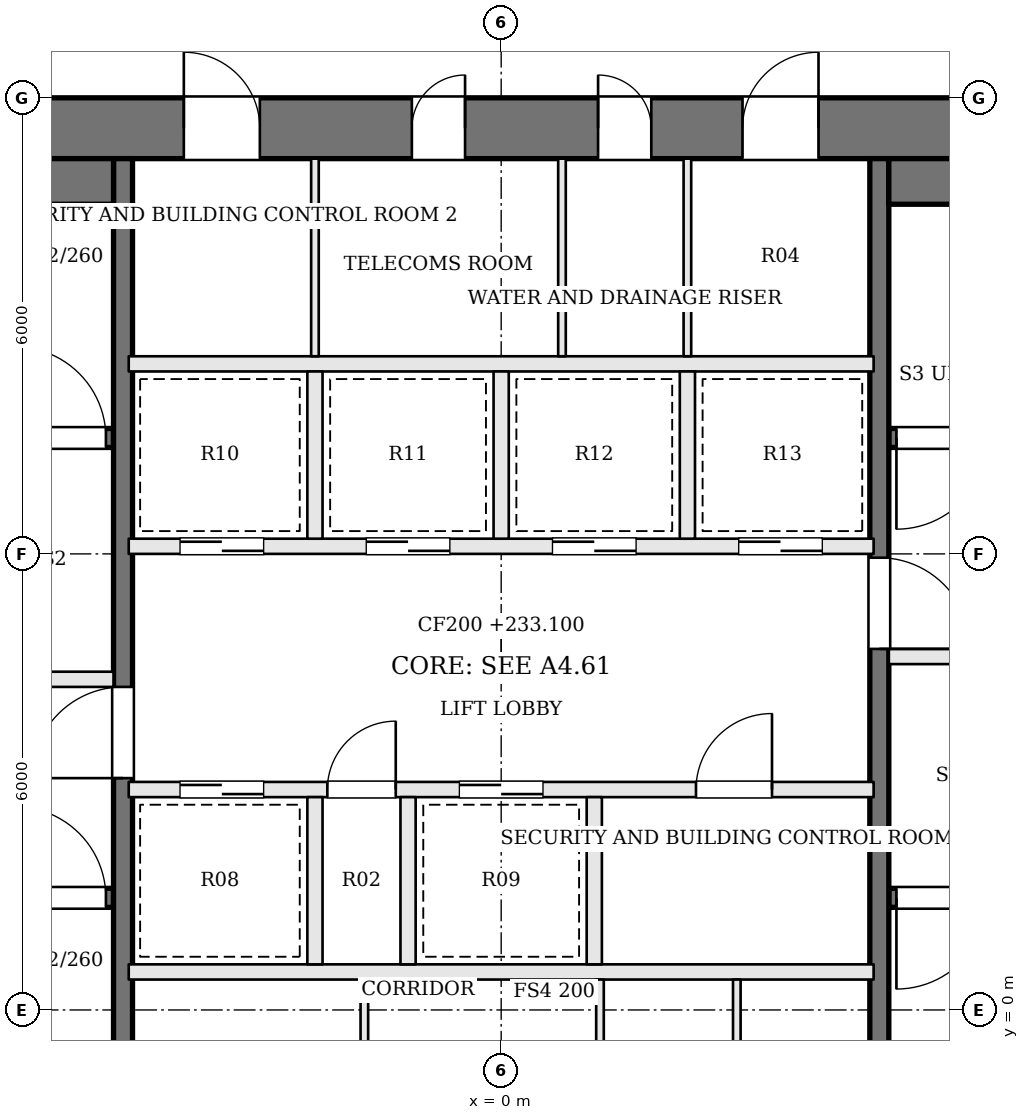
"""IFC4 building model, lengths in metres.
Left out: names, types, materials, properties, quantities, classifications, styles, units other than length and angle.
Written with IfcOpenShell. Run it as: python <this file> out.ifc"""

import sys

from ifc_helpers import new_model, si_unit, direction, frame, frame_2d, origin, place, context, subcontext, project, spatial, rectangle, extrude, element, fill, save


model = new_model("IFC4")
c1 = context("Model", 3, precision=1e-05, world=origin(), true_north=direction((0.0, 1.0)))
c2 = subcontext(c1, "Body", "Model", "MODEL_VIEW")
j1 = project(units=[si_unit("LENGTHUNIT", "METRE"), si_unit("PLANEANGLEUNIT", "RADIAN")], contexts=[c1])
p1 = place(None, origin())
s1 = spatial("IfcSite", under=j1, at=p1, CompositionType="ELEMENT")
p2 = place(p1, origin())
s2 = spatial("IfcBuilding", under=s1, at=p2, CompositionType="ELEMENT")
p3 = place(p2, frame((0.0, 0.0, 233.1)))
s3 = spatial("IfcBuildingStorey", under=s2, at=p3, CompositionType="ELEMENT", Elevation=233.1)
p4 = place(p3, frame((-13.0, 11.6, 0.0), z_axis=(0.0, 0.0, 1.0), x_axis=(1.0, 0.0, 0.0)))
e1 = element("IfcWall", 1, at=p4, inside=s3, PredefinedType="SHEAR", context=c2, shape_type="SweptSolid", body=[
    extrude(rectangle(XDim=26.0, YDim=0.8, at=frame_2d((13.0, 0.0))), origin(), (0.0, 0.0, 1.0), 3.9),
])
p5 = place(p4, frame((8.825, 0.0, 0.0)))
e2 = element("IfcOpeningElement", 2, at=p5, cuts=e1, PredefinedType="OPENING", context=c2, shape_type="SweptSolid", body=[
    extrude(rectangle(XDim=1.0, YDim=2.1, at=frame_2d((0.5, 1.05))), frame((0.0, 0.41, 0.0), z_axis=(0.0, -1.0, 0.0), x_axis=(1.0, 0.0, 0.0)), (0.0, 0.0, 1.0), 0.82),
])
p6 = place(p4, frame((11.825, 0.0, 0.0)))
e3 = element("IfcOpeningElement", 3, at=p6, cuts=e1, PredefinedType="OPENING", context=c2, shape_type="SweptSolid", body=[
    extrude(rectangle(XDim=0.7, YDim=2.1, at=frame_2d((0.35, 1.05))), frame((0.0, 0.41, 0.0), z_axis=(0.0, -1.0, 0.0), x_axis=(1.0, 0.0, 0.0)), (0.0, 0.0, 1.0), 0.82),
])
p7 = place(p4, frame((14.275, 0.0, 0.0)))
e4 = element("IfcOpeningElement", 4, at=p7, cuts=e1, PredefinedType="OPENING", context=c2, shape_type="SweptSolid", body=[
    extrude(rectangle(XDim=0.7, YDim=2.1, at=frame_2d((0.35, 1.05))), frame((0.0, 0.41, 0.0), z_axis=(0.0, -1.0, 0.0), x_axis=(1.0, 0.0, 0.0)), (0.0, 0.0, 1.0), 0.82),
])
p8 = place(p4, frame((16.175, 0.0, 0.0)))
e5 = element("IfcOpeningElement", 5, at=p8, cuts=e1, PredefinedType="OPENING", context=c2, shape_type="SweptSolid", body=[
    extrude(rectangle(XDim=1.0, YDim=2.1, at=frame_2d((0.5, 1.05))), frame((0.0, 0.41, 0.0), z_axis=(0.0, -1.0, 0.0), x_axis=(1.0, 0.0, 0.0)), (0.0, 0.0, 1.0), 0.82),
])
p9 = place(p3, frame((-12.2, 1.475, 0.0), z_axis=(0.0, 0.0, 1.0), x_axis=(1.0, 0.0, 0.0)))
e6 = element("IfcWall", 6, at=p9, inside=s3, PredefinedType="SOLIDWALL", context=c2, shape_type="SweptSolid", body=[
    extrude(rectangle(XDim=7.1, YDim=0.25, at=frame_2d((3.55, 0.0))), origin(), (0.0, 0.0, 1.0), 3.7),
])
p10 = place(p9, frame((5.8, 0.0, 0.0)))
e7 = element("IfcOpeningElement", 7, at=p10, cuts=e6, PredefinedType="OPENING", context=c2, shape_type="SweptSolid", body=[
    extrude(rectangle(XDim=1.2, YDim=2.1, at=frame_2d((0.6, 1.05))), frame((0.0, 0.135, 0.0), z_axis=(0.0, -1.0, 0.0), x_axis=(1.0, 0.0, 0.0)), (0.0, 0.0, 1.0), 0.27),
])
p11 = place(p3, frame((12.2, 7.525, 0.0), z_axis=(0.0, 0.0, 1.0), x_axis=(-1.0, 0.0, 0.0)))
e8 = element("IfcWall", 8, at=p11, inside=s3, PredefinedType="SOLIDWALL", context=c2, shape_type="SweptSolid", body=[
    extrude(rectangle(XDim=7.1, YDim=0.25, at=frame_2d((3.55, 0.0))), origin(), (0.0, 0.0, 1.0), 3.7),
])
p12 = place(p11, frame((5.8, 0.0, 0.0)))
e9 = element("IfcOpeningElement", 9, at=p12, cuts=e8, PredefinedType="OPENING", context=c2, shape_type="SweptSolid", body=[
    extrude(rectangle(XDim=1.2, YDim=2.1, at=frame_2d((0.6, 1.05))), frame((0.0, 0.135, 0.0), z_axis=(0.0, -1.0, 0.0), x_axis=(1.0, 0.0, 0.0)), (0.0, 0.0, 1.0), 0.27),
])
p13 = place(p3, frame((-12.2, 4.35, 0.0), z_axis=(0.0, 0.0, 1.0), x_axis=(1.0, 0.0, 0.0)))
e10 = element("IfcWall", 10, at=p13, inside=s3, PredefinedType="SOLIDWALL", context=c2, shape_type="SweptSolid", body=[
    extrude(rectangle(XDim=7.1, YDim=0.2, at=frame_2d((3.55, 0.0))), origin(), (0.0, 0.0, 1.0), 3.7),
])
p14 = place(p13, frame((4.4, 0.0, 0.0)))
e11 = element("IfcOpeningElement", 11, at=p14, cuts=e10, PredefinedType="OPENING", context=c2, shape_type="SweptSolid", body=[
    extrude(rectangle(XDim=1.2, YDim=2.1, at=frame_2d((0.6, 1.05))), frame((0.0, 0.11, 0.0), z_axis=(0.0, -1.0, 0.0), x_axis=(1.0, 0.0, 0.0)), (0.0, 0.0, 1.0), 0.22),
])
p15 = place(p13, frame((1.1, 0.0, 0.0)))
e12 = element("IfcOpeningElement", 12, at=p15, cuts=e10, PredefinedType="OPENING", context=c2, shape_type="SweptSolid", body=[
    extrude(rectangle(XDim=1.2, YDim=2.1, at=frame_2d((0.6, 1.05))), frame((0.0, 0.11, 0.0), z_axis=(0.0, -1.0, 0.0), x_axis=(1.0, 0.0, 0.0)), (0.0, 0.0, 1.0), 0.22),
])
p16 = place(p3, frame((12.2, 4.65, 0.0), z_axis=(0.0, 0.0, 1.0), x_axis=(-1.0, 0.0, 0.0)))
e13 = element("IfcWall", 13, at=p16, inside=s3, PredefinedType="SOLIDWALL", context=c2, shape_type="SweptSolid", body=[
    extrude(rectangle(XDim=7.1, YDim=0.2, at=frame_2d((3.55, 0.0))), origin(), (0.0, 0.0, 1.0), 3.7),
])
p17 = place(p16, frame((4.4, 0.0, 0.0)))
e14 = element("IfcOpeningElement", 14, at=p17, cuts=e13, PredefinedType="OPENING", context=c2, shape_type="SweptSolid", body=[
    extrude(rectangle(XDim=1.2, YDim=2.1, at=frame_2d((0.6, 1.05))), frame((0.0, 0.11, 0.0), z_axis=(0.0, -1.0, 0.0), x_axis=(1.0, 0.0, 0.0)), (0.0, 0.0, 1.0), 0.22),
])
p18 = place(p16, frame((1.1, 0.0, 0.0)))
e15 = element("IfcOpeningElement", 15, at=p18, cuts=e13, PredefinedType="OPENING", context=c2, shape_type="SweptSolid", body=[
    extrude(rectangle(XDim=1.2, YDim=2.1, at=frame_2d((0.6, 1.05))), frame((0.0, 0.11, 0.0), z_axis=(0.0, -1.0, 0.0), x_axis=(1.0, 0.0, 0.0)), (0.0, 0.0, 1.0), 0.22),
])
p19 = place(p3, frame((-12.2, 7.525, 0.0), z_axis=(0.0, 0.0, 1.0), x_axis=(1.0, 0.0, 0.0)))
e16 = element("IfcWall", 16, at=p19, inside=s3, PredefinedType="SOLIDWALL", context=c2, shape_type="SweptSolid", body=[
    extrude(rectangle(XDim=7.1, YDim=0.25, at=frame_2d((3.55, 0.0))), origin(), (0.0, 0.0, 1.0), 3.7),
])
p20 = place(p19, frame((5.8, 0.0, 0.0)))
e17 = element("IfcOpeningElement", 17, at=p20, cuts=e16, PredefinedType="OPENING", context=c2, shape_type="SweptSolid", body=[
    extrude(rectangle(XDim=1.2, YDim=2.1, at=frame_2d((0.6, 1.05))), frame((0.0, 0.135, 0.0), z_axis=(0.0, -1.0, 0.0), x_axis=(1.0, 0.0, 0.0)), (0.0, 0.0, 1.0), 0.27),
])
p21 = place(p3, frame((12.2, 1.475, 0.0), z_axis=(0.0, 0.0, 1.0), x_axis=(-1.0, 0.0, 0.0)))
e18 = element("IfcWall", 18, at=p21, inside=s3, PredefinedType="SOLIDWALL", context=c2, shape_type="SweptSolid", body=[
    extrude(rectangle(XDim=7.1, YDim=0.25, at=frame_2d((3.55, 0.0))), origin(), (0.0, 0.0, 1.0), 3.7),
])
p22 = place(p21, frame((5.8, 0.0, 0.0)))
e19 = element("IfcOpeningElement", 19, at=p22, cuts=e18, PredefinedType="OPENING", context=c2, shape_type="SweptSolid", body=[
    extrude(rectangle(XDim=1.2, YDim=2.1, at=frame_2d((0.6, 1.05))), frame((0.0, 0.135, 0.0), z_axis=(0.0, -1.0, 0.0), x_axis=(1.0, 0.0, 0.0)), (0.0, 0.0, 1.0), 0.27),
])
p23 = place(p3, frame((-4.975, -2.2, 0.0), z_axis=(0.0, 0.0, 1.0), x_axis=(0.0, 1.0, 0.0)))
e20 = element("IfcWall", 20, at=p23, inside=s3, PredefinedType="SOLIDWALL", context=c2, shape_type="SweptSolid", body=[
    extrude(rectangle(XDim=13.4, YDim=0.25, at=frame_2d((6.7, 0.0))), origin(), (0.0, 0.0, 1.0), 3.7),
])
p24 = place(p23, frame((5.25, 0.0, 0.0)))
e21 = element("IfcOpeningElement", 21, at=p24, cuts=e20, PredefinedType="OPENING", context=c2, shape_type="SweptSolid", body=[
    extrude(rectangle(XDim=1.2, YDim=2.1, at=frame_2d((0.6, 1.05))), frame((0.0, 0.135, 0.0), z_axis=(0.0, -1.0, 0.0), x_axis=(1.0, 0.0, 0.0)), (0.0, 0.0, 1.0), 0.27),
])
p25 = place(p3, frame((4.975, 11.2, 0.0), z_axis=(0.0, 0.0, 1.0), x_axis=(0.0, -1.0, 0.0)))
e22 = element("IfcWall", 22, at=p25, inside=s3, PredefinedType="SOLIDWALL", context=c2, shape_type="SweptSolid", body=[
    extrude(rectangle(XDim=13.4, YDim=0.25, at=frame_2d((6.7, 0.0))), origin(), (0.0, 0.0, 1.0), 3.7),
])
p26 = place(p25, frame((5.25, 0.0, 0.0)))
e23 = element("IfcOpeningElement", 23, at=p26, cuts=e22, PredefinedType="OPENING", context=c2, shape_type="SweptSolid", body=[
    extrude(rectangle(XDim=1.2, YDim=2.1, at=frame_2d((0.6, 1.05))), frame((0.0, 0.135, 0.0), z_axis=(0.0, -1.0, 0.0), x_axis=(1.0, 0.0, 0.0)), (0.0, 0.0, 1.0), 0.27),
])
for number, where, z_axis, x_axis in (
    (24, (-12.2, 10.9, 0.0), (0.0, 0.0, 1.0), (1.0, 0.0, 0.0)),
    (25, (12.2, 10.9, 0.0), (0.0, 0.0, 1.0), (-1.0, 0.0, 0.0)),
):
    element("IfcWall", number, at=place(p3, frame(where, z_axis=z_axis, x_axis=x_axis)), inside=s3, PredefinedType="SOLIDWALL", context=c2, shape_type="SweptSolid", body=[
        extrude(rectangle(XDim=7.1, YDim=0.6, at=frame_2d((3.55, 0.0))), origin(), (0.0, 0.0, 1.0), 3.7),
    ])
p27 = place(p3, frame((-4.9, 0.5, 0.0), z_axis=(0.0, 0.0, 1.0), x_axis=(1.0, 0.0, 0.0)))
e26 = element("IfcWall", 26, at=p27, inside=s3, PredefinedType="SOLIDWALL", context=c2, shape_type="SweptSolid", body=[
    extrude(rectangle(XDim=9.8, YDim=0.2, at=frame_2d((4.9, 0.0))), origin(), (0.0, 0.0, 1.0), 3.7),
])
p28 = place(p3, frame((-4.9, 2.9, 0.0), z_axis=(0.0, 0.0, 1.0), x_axis=(1.0, 0.0, 0.0)))
e27 = element("IfcWall", 27, at=p28, inside=s3, PredefinedType="SOLIDWALL", context=c2, shape_type="SweptSolid", body=[
    extrude(rectangle(XDim=9.8, YDim=0.2, at=frame_2d((4.9, 0.0))), origin(), (0.0, 0.0, 1.0), 3.7),
])
p29 = place(p28, frame((0.675, 0.0, 0.0)))
e28 = element("IfcOpeningElement", 28, at=p29, cuts=e27, PredefinedType="OPENING", context=c2, shape_type="SweptSolid", body=[
    extrude(rectangle(XDim=1.1, YDim=2.1, at=frame_2d((0.55, 1.05))), frame((0.0, 0.11, 0.0), z_axis=(0.0, -1.0, 0.0), x_axis=(1.0, 0.0, 0.0)), (0.0, 0.0, 1.0), 0.22),
])
p30 = place(p28, frame((2.613, 0.0, 0.0)))
e29 = element("IfcOpeningElement", 29, at=p30, cuts=e27, PredefinedType="OPENING", context=c2, shape_type="SweptSolid", body=[
    extrude(rectangle(XDim=0.9, YDim=2.1, at=frame_2d((0.45, 1.05))), frame((0.0, 0.11, 0.0), z_axis=(0.0, -1.0, 0.0), x_axis=(1.0, 0.0, 0.0)), (0.0, 0.0, 1.0), 0.22),
])
p31 = place(p28, frame((4.35, 0.0, 0.0)))
e30 = element("IfcOpeningElement", 30, at=p31, cuts=e27, PredefinedType="OPENING", context=c2, shape_type="SweptSolid", body=[
    extrude(rectangle(XDim=1.1, YDim=2.1, at=frame_2d((0.55, 1.05))), frame((0.0, 0.11, 0.0), z_axis=(0.0, -1.0, 0.0), x_axis=(1.0, 0.0, 0.0)), (0.0, 0.0, 1.0), 0.22),
])
p32 = place(p28, frame((7.463, 0.0, 0.0)))
e31 = element("IfcOpeningElement", 31, at=p32, cuts=e27, PredefinedType="OPENING", context=c2, shape_type="SweptSolid", body=[
    extrude(rectangle(XDim=1.0, YDim=2.1, at=frame_2d((0.5, 1.05))), frame((0.0, 0.11, 0.0), z_axis=(0.0, -1.0, 0.0), x_axis=(1.0, 0.0, 0.0)), (0.0, 0.0, 1.0), 0.22),
])
p33 = place(p3, frame((-4.9, 6.1, 0.0), z_axis=(0.0, 0.0, 1.0), x_axis=(1.0, 0.0, 0.0)))
e32 = element("IfcWall", 32, at=p33, inside=s3, PredefinedType="SOLIDWALL", context=c2, shape_type="SweptSolid", body=[
    extrude(rectangle(XDim=9.8, YDim=0.2, at=frame_2d((4.9, 0.0))), origin(), (0.0, 0.0, 1.0), 3.7),
])
p34 = place(p33, frame((0.675, 0.0, 0.0)))
e33 = element("IfcOpeningElement", 33, at=p34, cuts=e32, PredefinedType="OPENING", context=c2, shape_type="SweptSolid", body=[
    extrude(rectangle(XDim=1.1, YDim=2.1, at=frame_2d((0.55, 1.05))), frame((0.0, 0.11, 0.0), z_axis=(0.0, -1.0, 0.0), x_axis=(1.0, 0.0, 0.0)), (0.0, 0.0, 1.0), 0.22),
])
p35 = place(p33, frame((3.125, 0.0, 0.0)))
e34 = element("IfcOpeningElement", 34, at=p35, cuts=e32, PredefinedType="OPENING", context=c2, shape_type="SweptSolid", body=[
    extrude(rectangle(XDim=1.1, YDim=2.1, at=frame_2d((0.55, 1.05))), frame((0.0, 0.11, 0.0), z_axis=(0.0, -1.0, 0.0), x_axis=(1.0, 0.0, 0.0)), (0.0, 0.0, 1.0), 0.22),
])
p36 = place(p33, frame((5.575, 0.0, 0.0)))
e35 = element("IfcOpeningElement", 35, at=p36, cuts=e32, PredefinedType="OPENING", context=c2, shape_type="SweptSolid", body=[
    extrude(rectangle(XDim=1.1, YDim=2.1, at=frame_2d((0.55, 1.05))), frame((0.0, 0.11, 0.0), z_axis=(0.0, -1.0, 0.0), x_axis=(1.0, 0.0, 0.0)), (0.0, 0.0, 1.0), 0.22),
])
p37 = place(p33, frame((8.025, 0.0, 0.0)))
e36 = element("IfcOpeningElement", 36, at=p37, cuts=e32, PredefinedType="OPENING", context=c2, shape_type="SweptSolid", body=[
    extrude(rectangle(XDim=1.1, YDim=2.1, at=frame_2d((0.55, 1.05))), frame((0.0, 0.11, 0.0), z_axis=(0.0, -1.0, 0.0), x_axis=(1.0, 0.0, 0.0)), (0.0, 0.0, 1.0), 0.22),
])
p38 = place(p3, frame((-4.9, 8.5, 0.0), z_axis=(0.0, 0.0, 1.0), x_axis=(1.0, 0.0, 0.0)))
e37 = element("IfcWall", 37, at=p38, inside=s3, PredefinedType="SOLIDWALL", context=c2, shape_type="SweptSolid", body=[
    extrude(rectangle(XDim=9.8, YDim=0.2, at=frame_2d((4.9, 0.0))), origin(), (0.0, 0.0, 1.0), 3.7),
])
for number, where, z_axis, x_axis in (
    (38, (-2.45, 0.6, 0.0), (0.0, 0.0, 1.0), (0.0, 1.0, 0.0)),
    (39, (-1.225, 0.6, 0.0), (0.0, 0.0, 1.0), (0.0, 1.0, 0.0)),
    (40, (1.225, 0.6, 0.0), (0.0, 0.0, 1.0), (0.0, 1.0, 0.0)),
    (41, (-2.45, 6.2, 0.0), (0.0, 0.0, 1.0), (0.0, 1.0, 0.0)),
    (42, (0.0, 6.2, 0.0), (0.0, 0.0, 1.0), (0.0, 1.0, 0.0)),
    (43, (2.45, 6.2, 0.0), (0.0, 0.0, 1.0), (0.0, 1.0, 0.0)),
):
    element("IfcWall", number, at=place(p3, frame(where, z_axis=z_axis, x_axis=x_axis)), inside=s3, PredefinedType="SOLIDWALL", context=c2, shape_type="SweptSolid", body=[
        extrude(rectangle(XDim=2.2, YDim=0.2, at=frame_2d((1.1, 0.0))), origin(), (0.0, 0.0, 1.0), 3.7),
    ])
for number, where, z_axis, x_axis in (
    (44, (-1.8, -2.2, 0.0), (0.0, 0.0, 1.0), (0.0, 1.0, 0.0)),
    (45, (1.3, -2.2, 0.0), (0.0, 0.0, 1.0), (0.0, 1.0, 0.0)),
    (46, (3.1, -2.2, 0.0), (0.0, 0.0, 1.0), (0.0, 1.0, 0.0)),
    (47, (-2.45, 8.6, 0.0), (0.0, 0.0, 1.0), (0.0, 1.0, 0.0)),
    (48, (0.8, 8.6, 0.0), (0.0, 0.0, 1.0), (0.0, 1.0, 0.0)),
    (49, (2.45, 8.6, 0.0), (0.0, 0.0, 1.0), (0.0, 1.0, 0.0)),
):
    element("IfcWall", number, at=place(p3, frame(where, z_axis=z_axis, x_axis=x_axis)), inside=s3, PredefinedType="PARTITIONING", context=c2, shape_type="SweptSolid", body=[
        extrude(rectangle(XDim=2.6, YDim=0.1, at=frame_2d((1.3, 0.0))), origin(), (0.0, 0.0, 1.0), 3.7),
    ])
p39 = place(p24, origin())
e50 = element("IfcDoor", 50, at=p39, inside=s3, OperationType="SINGLE_SWING_LEFT", PredefinedType="DOOR", context=c2, shape_type="SweptSolid", body=[
    extrude(rectangle(XDim=1.2, YDim=2.1, at=frame_2d((0.6, 1.05))), frame((0.0, 0.025, 0.0), z_axis=(0.0, -1.0, 0.0), x_axis=(1.0, 0.0, 0.0)), (0.0, 0.0, 1.0), 0.05),
])
fill(e21, e50)
p40 = place(p26, origin())
e51 = element("IfcDoor", 51, at=p40, inside=s3, OperationType="SINGLE_SWING_RIGHT", PredefinedType="DOOR", context=c2, shape_type="SweptSolid", body=[
    extrude(rectangle(XDim=1.2, YDim=2.1, at=frame_2d((0.6, 1.05))), frame((0.0, 0.025, 0.0), z_axis=(0.0, -1.0, 0.0), x_axis=(1.0, 0.0, 0.0)), (0.0, 0.0, 1.0), 0.05),
])
fill(e23, e51)
p41 = place(p10, origin())
e52 = element("IfcDoor", 52, at=p41, inside=s3, OperationType="SINGLE_SWING_LEFT", PredefinedType="DOOR", context=c2, shape_type="SweptSolid", body=[
    extrude(rectangle(XDim=1.2, YDim=2.1, at=frame_2d((0.6, 1.05))), frame((0.0, 0.025, 0.0), z_axis=(0.0, -1.0, 0.0), x_axis=(1.0, 0.0, 0.0)), (0.0, 0.0, 1.0), 0.05),
])
fill(e7, e52)
p42 = place(p12, origin())
e53 = element("IfcDoor", 53, at=p42, inside=s3, OperationType="SINGLE_SWING_RIGHT", PredefinedType="DOOR", context=c2, shape_type="SweptSolid", body=[
    extrude(rectangle(XDim=1.2, YDim=2.1, at=frame_2d((0.6, 1.05))), frame((0.0, 0.025, 0.0), z_axis=(0.0, -1.0, 0.0), x_axis=(1.0, 0.0, 0.0)), (0.0, 0.0, 1.0), 0.05),
])
fill(e9, e53)
p43 = place(p20, origin())
e54 = element("IfcDoor", 54, at=p43, inside=s3, OperationType="SINGLE_SWING_LEFT", PredefinedType="DOOR", context=c2, shape_type="SweptSolid", body=[
    extrude(rectangle(XDim=1.2, YDim=2.1, at=frame_2d((0.6, 1.05))), frame((0.0, 0.025, 0.0), z_axis=(0.0, -1.0, 0.0), x_axis=(1.0, 0.0, 0.0)), (0.0, 0.0, 1.0), 0.05),
])
fill(e17, e54)
p44 = place(p22, origin())
e55 = element("IfcDoor", 55, at=p44, inside=s3, OperationType="SINGLE_SWING_RIGHT", PredefinedType="DOOR", context=c2, shape_type="SweptSolid", body=[
    extrude(rectangle(XDim=1.2, YDim=2.1, at=frame_2d((0.6, 1.05))), frame((0.0, 0.025, 0.0), z_axis=(0.0, -1.0, 0.0), x_axis=(1.0, 0.0, 0.0)), (0.0, 0.0, 1.0), 0.05),
])
fill(e19, e55)
p45 = place(p29, origin())
e56 = element("IfcDoor", 56, at=p45, inside=s3, OperationType="SLIDING_TO_RIGHT", PredefinedType="DOOR", context=c2, shape_type="SweptSolid", body=[
    extrude(rectangle(XDim=1.1, YDim=2.1, at=frame_2d((0.55, 1.05))), frame((0.0, 0.025, 0.0), z_axis=(0.0, -1.0, 0.0), x_axis=(1.0, 0.0, 0.0)), (0.0, 0.0, 1.0), 0.05),
])
fill(e28, e56)
p46 = place(p30, origin())
e57 = element("IfcDoor", 57, at=p46, inside=s3, OperationType="SINGLE_SWING_RIGHT", PredefinedType="DOOR", context=c2, shape_type="SweptSolid", body=[
    extrude(rectangle(XDim=0.9, YDim=2.1, at=frame_2d((0.45, 1.05))), frame((0.0, 0.025, 0.0), z_axis=(0.0, -1.0, 0.0), x_axis=(1.0, 0.0, 0.0)), (0.0, 0.0, 1.0), 0.05),
])
fill(e29, e57)
p47 = place(p31, origin())
e58 = element("IfcDoor", 58, at=p47, inside=s3, OperationType="SLIDING_TO_LEFT", PredefinedType="DOOR", context=c2, shape_type="SweptSolid", body=[
    extrude(rectangle(XDim=1.1, YDim=2.1, at=frame_2d((0.55, 1.05))), frame((0.0, 0.025, 0.0), z_axis=(0.0, -1.0, 0.0), x_axis=(1.0, 0.0, 0.0)), (0.0, 0.0, 1.0), 0.05),
])
fill(e30, e58)
p48 = place(p32, origin())
e59 = element("IfcDoor", 59, at=p48, inside=s3, OperationType="SINGLE_SWING_RIGHT", PredefinedType="DOOR", context=c2, shape_type="SweptSolid", body=[
    extrude(rectangle(XDim=1.0, YDim=2.1, at=frame_2d((0.5, 1.05))), frame((0.0, 0.025, 0.0), z_axis=(0.0, -1.0, 0.0), x_axis=(1.0, 0.0, 0.0)), (0.0, 0.0, 1.0), 0.05),
])
fill(e31, e59)
p49 = place(p34, origin())
e60 = element("IfcDoor", 60, at=p49, inside=s3, OperationType="SLIDING_TO_RIGHT", PredefinedType="DOOR", context=c2, shape_type="SweptSolid", body=[
    extrude(rectangle(XDim=1.1, YDim=2.1, at=frame_2d((0.55, 1.05))), frame((0.0, 0.025, 0.0), z_axis=(0.0, -1.0, 0.0), x_axis=(1.0, 0.0, 0.0)), (0.0, 0.0, 1.0), 0.05),
])
fill(e33, e60)
p50 = place(p35, origin())
e61 = element("IfcDoor", 61, at=p50, inside=s3, OperationType="SLIDING_TO_LEFT", PredefinedType="DOOR", context=c2, shape_type="SweptSolid", body=[
    extrude(rectangle(XDim=1.1, YDim=2.1, at=frame_2d((0.55, 1.05))), frame((0.0, 0.025, 0.0), z_axis=(0.0, -1.0, 0.0), x_axis=(1.0, 0.0, 0.0)), (0.0, 0.0, 1.0), 0.05),
])
fill(e34, e61)
p51 = place(p36, origin())
e62 = element("IfcDoor", 62, at=p51, inside=s3, OperationType="SLIDING_TO_RIGHT", PredefinedType="DOOR", context=c2, shape_type="SweptSolid", body=[
    extrude(rectangle(XDim=1.1, YDim=2.1, at=frame_2d((0.55, 1.05))), frame((0.0, 0.025, 0.0), z_axis=(0.0, -1.0, 0.0), x_axis=(1.0, 0.0, 0.0)), (0.0, 0.0, 1.0), 0.05),
])
fill(e35, e62)
p52 = place(p37, origin())
e63 = element("IfcDoor", 63, at=p52, inside=s3, OperationType="SLIDING_TO_LEFT", PredefinedType="DOOR", context=c2, shape_type="SweptSolid", body=[
    extrude(rectangle(XDim=1.1, YDim=2.1, at=frame_2d((0.55, 1.05))), frame((0.0, 0.025, 0.0), z_axis=(0.0, -1.0, 0.0), x_axis=(1.0, 0.0, 0.0)), (0.0, 0.0, 1.0), 0.05),
])
fill(e36, e63)
p53 = place(p5, origin())
e64 = element("IfcDoor", 64, at=p53, inside=s3, OperationType="SINGLE_SWING_LEFT", PredefinedType="DOOR", context=c2, shape_type="SweptSolid", body=[
    extrude(rectangle(XDim=1.0, YDim=2.1, at=frame_2d((0.5, 1.05))), frame((0.0, 0.025, 0.0), z_axis=(0.0, -1.0, 0.0), x_axis=(1.0, 0.0, 0.0)), (0.0, 0.0, 1.0), 0.05),
])
fill(e2, e64)
p54 = place(p6, origin())
e65 = element("IfcDoor", 65, at=p54, inside=s3, OperationType="SINGLE_SWING_RIGHT", PredefinedType="DOOR", context=c2, shape_type="SweptSolid", body=[
    extrude(rectangle(XDim=0.7, YDim=2.1, at=frame_2d((0.35, 1.05))), frame((0.0, 0.025, 0.0), z_axis=(0.0, -1.0, 0.0), x_axis=(1.0, 0.0, 0.0)), (0.0, 0.0, 1.0), 0.05),
])
fill(e3, e65)
p55 = place(p7, origin())
e66 = element("IfcDoor", 66, at=p55, inside=s3, OperationType="SINGLE_SWING_LEFT", PredefinedType="DOOR", context=c2, shape_type="SweptSolid", body=[
    extrude(rectangle(XDim=0.7, YDim=2.1, at=frame_2d((0.35, 1.05))), frame((0.0, 0.025, 0.0), z_axis=(0.0, -1.0, 0.0), x_axis=(1.0, 0.0, 0.0)), (0.0, 0.0, 1.0), 0.05),
])
fill(e4, e66)
p56 = place(p8, origin())
e67 = element("IfcDoor", 67, at=p56, inside=s3, OperationType="SINGLE_SWING_RIGHT", PredefinedType="DOOR", context=c2, shape_type="SweptSolid", body=[
    extrude(rectangle(XDim=1.0, YDim=2.1, at=frame_2d((0.5, 1.05))), frame((0.0, 0.025, 0.0), z_axis=(0.0, -1.0, 0.0), x_axis=(1.0, 0.0, 0.0)), (0.0, 0.0, 1.0), 0.05),
])
fill(e5, e67)
save(model, sys.argv[1])
